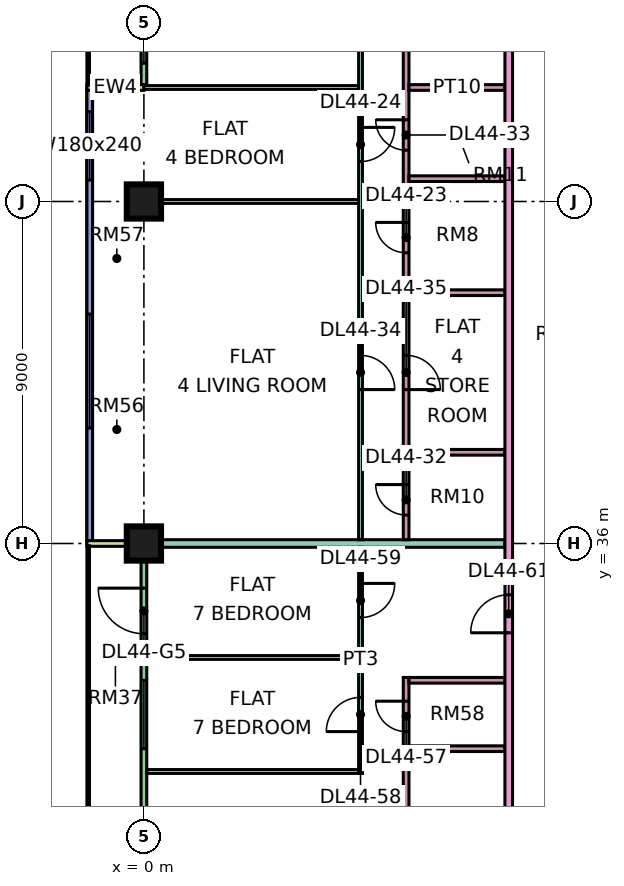
"""IFC4 building model, lengths in metres.
Left out: names, types, materials, properties, quantities, classifications, styles, units other than length and angle.
Written with IfcOpenShell. Run it as: python <this file> out.ifc"""

import sys

from ifc_helpers import new_model, si_unit, direction, frame, frame_2d, origin, origin_2d, place, context, subcontext, project, spatial, rectangle, extrude, element, fill, save


model = new_model("IFC4")
c1 = context("Model", 3, precision=1e-05, world=origin(), true_north=direction((0.0, 1.0)))
c2 = subcontext(c1, "Body", "Model", "MODEL_VIEW")
j1 = project(units=[si_unit("LENGTHUNIT", "METRE"), si_unit("PLANEANGLEUNIT", "RADIAN")], contexts=[c1])
p1 = place(None, origin())
s1 = spatial("IfcSite", under=j1, at=p1, CompositionType="ELEMENT")
p2 = place(p1, origin())
s2 = spatial("IfcBuilding", under=s1, at=p2, CompositionType="ELEMENT")
p3 = place(p2, frame((0.0, 0.0, 191.15)))
s3 = spatial("IfcBuildingStorey", under=s2, at=p3, CompositionType="ELEMENT", Elevation=191.15)
p4 = place(p3, frame((0.0, 36.0, 0.0), z_axis=(0.0, 0.0, 1.0), x_axis=(1.0, 0.0, 0.0)))
e1 = element("IfcColumn", 1, at=p4, inside=s3, PredefinedType="COLUMN", context=c2, shape_type="SweptSolid", body=[
    extrude(rectangle(XDim=0.9, YDim=0.9, at=origin_2d()), origin(), (0.0, 0.0, 1.0), 3.75),
])
p5 = place(p3, frame((0.0, 45.0, 0.0), z_axis=(0.0, 0.0, 1.0), x_axis=(1.0, 0.0, 0.0)))
e2 = element("IfcColumn", 2, at=p5, inside=s3, PredefinedType="COLUMN", context=c2, shape_type="SweptSolid", body=[
    extrude(rectangle(XDim=0.9, YDim=0.9, at=origin_2d()), origin(), (0.0, 0.0, 1.0), 3.75),
])
p6 = place(p3, frame((0.0, 61.425, 0.0), z_axis=(0.0, 0.0, 1.0), x_axis=(0.0, -1.0, 0.0)))
e3 = element("IfcWall", 3, at=p6, inside=s3, PredefinedType="SOLIDWALL", context=c2, shape_type="SweptSolid", body=[
    extrude(rectangle(XDim=13.35, YDim=0.15, at=frame_2d((6.675, 0.0))), origin(), (0.0, 0.0, 1.0), 3.35),
])
p7 = place(p6, frame((0.262, 0.0, 0.45)))
e4 = element("IfcOpeningElement", 4, at=p7, cuts=e3, PredefinedType="OPENING", context=c2, shape_type="SweptSolid", body=[
    extrude(rectangle(XDim=0.9, YDim=2.4, at=frame_2d((0.45, 1.2))), frame((0.0, 0.085, 0.0), z_axis=(0.0, -1.0, 0.0), x_axis=(1.0, 0.0, 0.0)), (0.0, 0.0, 1.0), 0.17),
])
p8 = place(p6, frame((2.025, 0.0, 0.0)))
e5 = element("IfcOpeningElement", 5, at=p8, cuts=e3, PredefinedType="OPENING", context=c2, shape_type="SweptSolid", body=[
    extrude(rectangle(XDim=1.8, YDim=2.4, at=frame_2d((0.9, 1.2))), frame((0.0, 0.085, 0.0), z_axis=(0.0, -1.0, 0.0), x_axis=(1.0, 0.0, 0.0)), (0.0, 0.0, 1.0), 0.17),
])
p9 = place(p6, frame((5.05, 0.0, 0.45)))
e6 = element("IfcOpeningElement", 6, at=p9, cuts=e3, PredefinedType="OPENING", context=c2, shape_type="SweptSolid", body=[
    extrude(rectangle(XDim=1.2, YDim=2.4, at=frame_2d((0.6, 1.2))), frame((0.0, 0.085, 0.0), z_axis=(0.0, -1.0, 0.0), x_axis=(1.0, 0.0, 0.0)), (0.0, 0.0, 1.0), 0.17),
])
p10 = place(p6, frame((8.6, 0.0, 0.45)))
e7 = element("IfcOpeningElement", 7, at=p10, cuts=e3, PredefinedType="OPENING", context=c2, shape_type="SweptSolid", body=[
    extrude(rectangle(XDim=1.2, YDim=2.4, at=frame_2d((0.6, 1.2))), frame((0.0, 0.085, 0.0), z_axis=(0.0, -1.0, 0.0), x_axis=(1.0, 0.0, 0.0)), (0.0, 0.0, 1.0), 0.17),
])
p11 = place(p6, frame((10.988, 0.0, 0.45)))
e8 = element("IfcOpeningElement", 8, at=p11, cuts=e3, PredefinedType="OPENING", context=c2, shape_type="SweptSolid", body=[
    extrude(rectangle(XDim=1.8, YDim=2.4, at=frame_2d((0.9, 1.2))), frame((0.0, 0.085, 0.0), z_axis=(0.0, -1.0, 0.0), x_axis=(1.0, 0.0, 0.0)), (0.0, 0.0, 1.0), 0.17),
])
p12 = place(p3, frame((-1.5, 48.0, 0.0), z_axis=(0.0, 0.0, 1.0), x_axis=(1.0, 0.0, 0.0)))
e9 = element("IfcWall", 9, at=p12, inside=s3, PredefinedType="SOLIDWALL", context=c2, shape_type="SweptSolid", body=[
    extrude(rectangle(XDim=1.5, YDim=0.15, at=frame_2d((0.75, 0.0))), origin(), (0.0, 0.0, 1.0), 3.35),
])
p13 = place(p3, frame((-1.425, 47.925, 0.0), z_axis=(0.0, 0.0, 1.0), x_axis=(0.0, -1.0, 0.0)))
e10 = element("IfcWall", 10, at=p13, inside=s3, PredefinedType="SOLIDWALL", context=c2, shape_type="SweptSolid", body=[
    extrude(rectangle(XDim=11.85, YDim=0.15, at=frame_2d((5.925, 0.0))), origin(), (0.0, 0.0, 1.0), 3.35),
])
p14 = place(p13, frame((0.562, 0.0, 0.45)))
e11 = element("IfcOpeningElement", 11, at=p14, cuts=e10, PredefinedType="OPENING", context=c2, shape_type="SweptSolid", body=[
    extrude(rectangle(XDim=1.8, YDim=2.4, at=frame_2d((0.9, 1.2))), frame((0.0, 0.085, 0.0), z_axis=(0.0, -1.0, 0.0), x_axis=(1.0, 0.0, 0.0)), (0.0, 0.0, 1.0), 0.17),
])
p15 = place(p13, frame((5.887, 0.0, 0.45)))
e12 = element("IfcOpeningElement", 12, at=p15, cuts=e10, PredefinedType="OPENING", context=c2, shape_type="SweptSolid", body=[
    extrude(rectangle(XDim=3.0, YDim=2.4, at=frame_2d((1.5, 1.2))), frame((0.0, 0.085, 0.0), z_axis=(0.0, -1.0, 0.0), x_axis=(1.0, 0.0, 0.0)), (0.0, 0.0, 1.0), 0.17),
])
p16 = place(p3, frame((0.0, 35.925, 0.0), z_axis=(0.0, 0.0, 1.0), x_axis=(0.0, -1.0, 0.0)))
e13 = element("IfcWall", 13, at=p16, inside=s3, PredefinedType="SOLIDWALL", context=c2, shape_type="SweptSolid", body=[
    extrude(rectangle(XDim=11.85, YDim=0.15, at=frame_2d((5.925, 0.0))), origin(), (0.0, 0.0, 1.0), 3.35),
])
p17 = place(p16, frame((1.1, 0.0, 0.0)))
e14 = element("IfcOpeningElement", 14, at=p17, cuts=e13, PredefinedType="OPENING", context=c2, shape_type="SweptSolid", body=[
    extrude(rectangle(XDim=1.2, YDim=2.4, at=frame_2d((0.6, 1.2))), frame((0.0, 0.085, 0.0), z_axis=(0.0, -1.0, 0.0), x_axis=(1.0, 0.0, 0.0)), (0.0, 0.0, 1.0), 0.17),
])
p18 = place(p16, frame((3.525, 0.0, 0.45)))
e15 = element("IfcOpeningElement", 15, at=p18, cuts=e13, PredefinedType="OPENING", context=c2, shape_type="SweptSolid", body=[
    extrude(rectangle(XDim=1.8, YDim=2.4, at=frame_2d((0.9, 1.2))), frame((0.0, 0.085, 0.0), z_axis=(0.0, -1.0, 0.0), x_axis=(1.0, 0.0, 0.0)), (0.0, 0.0, 1.0), 0.17),
])
p19 = place(p16, frame((7.15, 0.0, 0.45)))
e16 = element("IfcOpeningElement", 16, at=p19, cuts=e13, PredefinedType="OPENING", context=c2, shape_type="SweptSolid", body=[
    extrude(rectangle(XDim=3.0, YDim=2.4, at=frame_2d((1.5, 1.2))), frame((0.0, 0.085, 0.0), z_axis=(0.0, -1.0, 0.0), x_axis=(1.0, 0.0, 0.0)), (0.0, 0.0, 1.0), 0.17),
])
p20 = place(p3, frame((-1.5, 36.0, 0.0), z_axis=(0.0, 0.0, 1.0), x_axis=(1.0, 0.0, 0.0)))
e17 = element("IfcWall", 17, at=p20, inside=s3, PredefinedType="SOLIDWALL", context=c2, shape_type="SweptSolid", body=[
    extrude(rectangle(XDim=1.5, YDim=0.15, at=frame_2d((0.75, 0.0))), origin(), (0.0, 0.0, 1.0), 3.35),
])
e18 = element("IfcWall", 18, at=p4, inside=s3, PredefinedType="PARTITIONING", context=c2, shape_type="SweptSolid", body=[
    extrude(rectangle(XDim=9.5, YDim=0.2, at=frame_2d((4.75, 0.0))), origin(), (0.0, 0.0, 1.0), 3.35),
])
e19 = element("IfcWall", 19, at=p5, inside=s3, PredefinedType="PARTITIONING", context=c2, shape_type="SweptSolid", body=[
    extrude(rectangle(XDim=5.65, YDim=0.1, at=frame_2d((2.825, 0.0))), origin(), (0.0, 0.0, 1.0), 3.35),
])
p21 = place(p3, frame((0.0, 48.0, 0.0), z_axis=(0.0, 0.0, 1.0), x_axis=(1.0, 0.0, 0.0)))
e20 = element("IfcWall", 20, at=p21, inside=s3, PredefinedType="PARTITIONING", context=c2, shape_type="SweptSolid", body=[
    extrude(rectangle(XDim=5.65, YDim=0.1, at=frame_2d((2.825, 0.0))), origin(), (0.0, 0.0, 1.0), 3.35),
])
for number, where, z_axis, x_axis in (
    (21, (0.074, 30.0, 0.0), (0.0, 0.0, 1.0), (1.0, 0.0, 0.0)),
    (22, (0.074, 33.0, 0.0), (0.0, 0.0, 1.0), (1.0, 0.0, 0.0)),
):
    element("IfcWall", number, at=place(p3, frame(where, z_axis=z_axis, x_axis=x_axis)), inside=s3, PredefinedType="PARTITIONING", context=c2, shape_type="SweptSolid", body=[
        extrude(rectangle(XDim=5.576, YDim=0.1, at=frame_2d((2.788, 0.0))), origin(), (0.0, 0.0, 1.0), 3.35),
    ])
p22 = place(p3, frame((5.7, 29.95, 0.0), z_axis=(0.0, 0.0, 1.0), x_axis=(0.0, 1.0, 0.0)))
e23 = element("IfcWall", 23, at=p22, inside=s3, PredefinedType="PARTITIONING", context=c2, shape_type="SweptSolid", body=[
    extrude(rectangle(XDim=5.95, YDim=0.1, at=frame_2d((2.975, 0.0))), origin(), (0.0, 0.0, 1.0), 3.35),
])
p23 = place(p22, frame((1.1, 0.0, 0.0)))
e24 = element("IfcOpeningElement", 24, at=p23, cuts=e23, PredefinedType="OPENING", context=c2, shape_type="SweptSolid", body=[
    extrude(rectangle(XDim=0.9, YDim=2.1, at=frame_2d((0.45, 1.05))), frame((0.0, 0.06, 0.0), z_axis=(0.0, -1.0, 0.0), x_axis=(1.0, 0.0, 0.0)), (0.0, 0.0, 1.0), 0.12),
])
p24 = place(p22, frame((4.1, 0.0, 0.0)))
e25 = element("IfcOpeningElement", 25, at=p24, cuts=e23, PredefinedType="OPENING", context=c2, shape_type="SweptSolid", body=[
    extrude(rectangle(XDim=0.9, YDim=2.1, at=frame_2d((0.45, 1.05))), frame((0.0, 0.06, 0.0), z_axis=(0.0, -1.0, 0.0), x_axis=(1.0, 0.0, 0.0)), (0.0, 0.0, 1.0), 0.12),
])
p25 = place(p3, frame((5.7, 36.1, 0.0), z_axis=(0.0, 0.0, 1.0), x_axis=(0.0, 1.0, 0.0)))
e26 = element("IfcWall", 26, at=p25, inside=s3, PredefinedType="PARTITIONING", context=c2, shape_type="SweptSolid", body=[
    extrude(rectangle(XDim=26.826, YDim=0.1, at=frame_2d((13.413, 0.0))), origin(), (0.0, 0.0, 1.0), 3.35),
])
p26 = place(p25, frame((9.95, 0.0, 0.0)))
e27 = element("IfcOpeningElement", 27, at=p26, cuts=e26, PredefinedType="OPENING", context=c2, shape_type="SweptSolid", body=[
    extrude(rectangle(XDim=0.9, YDim=2.1, at=frame_2d((0.45, 1.05))), frame((0.0, 0.06, 0.0), z_axis=(0.0, -1.0, 0.0), x_axis=(1.0, 0.0, 0.0)), (0.0, 0.0, 1.0), 0.12),
])
p27 = place(p25, frame((12.95, 0.0, 0.0)))
e28 = element("IfcOpeningElement", 28, at=p27, cuts=e26, PredefinedType="OPENING", context=c2, shape_type="SweptSolid", body=[
    extrude(rectangle(XDim=0.9, YDim=2.1, at=frame_2d((0.45, 1.05))), frame((0.0, 0.06, 0.0), z_axis=(0.0, -1.0, 0.0), x_axis=(1.0, 0.0, 0.0)), (0.0, 0.0, 1.0), 0.12),
])
p28 = place(p25, frame((15.95, 0.0, 0.0)))
e29 = element("IfcOpeningElement", 29, at=p28, cuts=e26, PredefinedType="OPENING", context=c2, shape_type="SweptSolid", body=[
    extrude(rectangle(XDim=0.9, YDim=2.1, at=frame_2d((0.45, 1.05))), frame((0.0, 0.06, 0.0), z_axis=(0.0, -1.0, 0.0), x_axis=(1.0, 0.0, 0.0)), (0.0, 0.0, 1.0), 0.12),
])
p29 = place(p25, frame((18.95, 0.0, 0.0)))
e30 = element("IfcOpeningElement", 30, at=p29, cuts=e26, PredefinedType="OPENING", context=c2, shape_type="SweptSolid", body=[
    extrude(rectangle(XDim=0.9, YDim=2.1, at=frame_2d((0.45, 1.05))), frame((0.0, 0.06, 0.0), z_axis=(0.0, -1.0, 0.0), x_axis=(1.0, 0.0, 0.0)), (0.0, 0.0, 1.0), 0.12),
])
p30 = place(p25, frame((24.95, 0.0, 0.0)))
e31 = element("IfcOpeningElement", 31, at=p30, cuts=e26, PredefinedType="OPENING", context=c2, shape_type="SweptSolid", body=[
    extrude(rectangle(XDim=0.9, YDim=2.1, at=frame_2d((0.45, 1.05))), frame((0.0, 0.06, 0.0), z_axis=(0.0, -1.0, 0.0), x_axis=(1.0, 0.0, 0.0)), (0.0, 0.0, 1.0), 0.12),
])
p31 = place(p25, frame((3.95, 0.0, 0.0)))
e32 = element("IfcOpeningElement", 32, at=p31, cuts=e26, PredefinedType="OPENING", context=c2, shape_type="SweptSolid", body=[
    extrude(rectangle(XDim=0.9, YDim=2.1, at=frame_2d((0.45, 1.05))), frame((0.0, 0.06, 0.0), z_axis=(0.0, -1.0, 0.0), x_axis=(1.0, 0.0, 0.0)), (0.0, 0.0, 1.0), 0.12),
])
p32 = place(p25, frame((21.95, 0.0, 0.0)))
e33 = element("IfcOpeningElement", 33, at=p32, cuts=e26, PredefinedType="OPENING", context=c2, shape_type="SweptSolid", body=[
    extrude(rectangle(XDim=0.9, YDim=2.1, at=frame_2d((0.45, 1.05))), frame((0.0, 0.06, 0.0), z_axis=(0.0, -1.0, 0.0), x_axis=(1.0, 0.0, 0.0)), (0.0, 0.0, 1.0), 0.12),
])
p33 = place(p3, frame((6.9, 22.5, 0.0), z_axis=(0.0, 0.0, 1.0), x_axis=(0.0, 1.0, 0.0)))
e34 = element("IfcWall", 34, at=p33, inside=s3, PredefinedType="PARTITIONING", context=c2, shape_type="SweptSolid", body=[
    extrude(rectangle(XDim=9.975, YDim=0.15, at=frame_2d((4.988, 0.0))), origin(), (0.0, 0.0, 1.0), 3.35),
])
p34 = place(p33, frame((8.55, 0.0, 0.0)))
e35 = element("IfcOpeningElement", 35, at=p34, cuts=e34, PredefinedType="OPENING", context=c2, shape_type="SweptSolid", body=[
    extrude(rectangle(XDim=0.8, YDim=2.1, at=frame_2d((0.4, 1.05))), frame((0.0, 0.085, 0.0), z_axis=(0.0, -1.0, 0.0), x_axis=(1.0, 0.0, 0.0)), (0.0, 0.0, 1.0), 0.17),
])
p35 = place(p33, frame((3.5, 0.0, 0.0)))
e36 = element("IfcOpeningElement", 36, at=p35, cuts=e34, PredefinedType="OPENING", context=c2, shape_type="SweptSolid", body=[
    extrude(rectangle(XDim=0.9, YDim=2.1, at=frame_2d((0.45, 1.05))), frame((0.0, 0.085, 0.0), z_axis=(0.0, -1.0, 0.0), x_axis=(1.0, 0.0, 0.0)), (0.0, 0.0, 1.0), 0.17),
])
p36 = place(p3, frame((6.9, 36.1, 0.0), z_axis=(0.0, 0.0, 1.0), x_axis=(0.0, 1.0, 0.0)))
e37 = element("IfcWall", 37, at=p36, inside=s3, PredefinedType="PARTITIONING", context=c2, shape_type="SweptSolid", body=[
    extrude(rectangle(XDim=14.675, YDim=0.15, at=frame_2d((7.337, 0.0))), origin(), (0.0, 0.0, 1.0), 3.35),
])
p37 = place(p36, frame((7.55, 0.0, 0.0)))
e38 = element("IfcOpeningElement", 38, at=p37, cuts=e37, PredefinedType="OPENING", context=c2, shape_type="SweptSolid", body=[
    extrude(rectangle(XDim=0.8, YDim=2.1, at=frame_2d((0.4, 1.05))), frame((0.0, 0.085, 0.0), z_axis=(0.0, -1.0, 0.0), x_axis=(1.0, 0.0, 0.0)), (0.0, 0.0, 1.0), 0.17),
])
p38 = place(p36, frame((0.65, 0.0, 0.0)))
e39 = element("IfcOpeningElement", 39, at=p38, cuts=e37, PredefinedType="OPENING", context=c2, shape_type="SweptSolid", body=[
    extrude(rectangle(XDim=0.8, YDim=2.1, at=frame_2d((0.4, 1.05))), frame((0.0, 0.085, 0.0), z_axis=(0.0, -1.0, 0.0), x_axis=(1.0, 0.0, 0.0)), (0.0, 0.0, 1.0), 0.17),
])
p39 = place(p36, frame((10.25, 0.0, 0.0)))
e40 = element("IfcOpeningElement", 40, at=p39, cuts=e37, PredefinedType="OPENING", context=c2, shape_type="SweptSolid", body=[
    extrude(rectangle(XDim=0.8, YDim=2.1, at=frame_2d((0.4, 1.05))), frame((0.0, 0.085, 0.0), z_axis=(0.0, -1.0, 0.0), x_axis=(1.0, 0.0, 0.0)), (0.0, 0.0, 1.0), 0.17),
])
p40 = place(p36, frame((3.95, 0.0, 0.0)))
e41 = element("IfcOpeningElement", 41, at=p40, cuts=e37, PredefinedType="OPENING", context=c2, shape_type="SweptSolid", body=[
    extrude(rectangle(XDim=0.9, YDim=2.1, at=frame_2d((0.45, 1.05))), frame((0.0, 0.085, 0.0), z_axis=(0.0, -1.0, 0.0), x_axis=(1.0, 0.0, 0.0)), (0.0, 0.0, 1.0), 0.17),
])
for number, where, z_axis, x_axis in (
    (42, (6.975, 30.6, 0.0), (0.0, 0.0, 1.0), (1.0, 0.0, 0.0)),
    (43, (6.975, 32.4, 0.0), (0.0, 0.0, 1.0), (1.0, 0.0, 0.0)),
    (44, (6.975, 38.4, 0.0), (0.0, 0.0, 1.0), (1.0, 0.0, 0.0)),
    (45, (6.975, 42.6, 0.0), (0.0, 0.0, 1.0), (1.0, 0.0, 0.0)),
    (46, (6.975, 45.6, 0.0), (0.0, 0.0, 1.0), (1.0, 0.0, 0.0)),
    (47, (6.975, 48.0, 0.0), (0.0, 0.0, 1.0), (1.0, 0.0, 0.0)),
):
    element("IfcWall", number, at=place(p3, frame(where, z_axis=z_axis, x_axis=x_axis)), inside=s3, PredefinedType="PARTITIONING", context=c2, shape_type="SweptSolid", body=[
        extrude(rectangle(XDim=2.525, YDim=0.15, at=frame_2d((1.262, 0.0))), origin(), (0.0, 0.0, 1.0), 3.35),
    ])
p41 = place(p3, frame((9.6, 20.0, 0.0), z_axis=(0.0, 0.0, 1.0), x_axis=(0.0, 1.0, 0.0)))
e48 = element("IfcWall", 48, at=p41, inside=s3, PredefinedType="PARTITIONING", context=c2, shape_type="SweptSolid", body=[
    extrude(rectangle(XDim=42.926, YDim=0.2, at=frame_2d((21.463, 0.0))), origin(), (0.0, 0.0, 1.0), 3.35),
])
p42 = place(p41, frame((31.65, 0.0, 0.0)))
e49 = element("IfcOpeningElement", 49, at=p42, cuts=e48, PredefinedType="OPENING", context=c2, shape_type="SweptSolid", body=[
    extrude(rectangle(XDim=1.0, YDim=2.1, at=frame_2d((0.5, 1.05))), frame((0.0, 0.11, 0.0), z_axis=(0.0, -1.0, 0.0), x_axis=(1.0, 0.0, 0.0)), (0.0, 0.0, 1.0), 0.22),
])
p43 = place(p41, frame((0.6, 0.0, 0.0)))
e50 = element("IfcOpeningElement", 50, at=p43, cuts=e48, PredefinedType="OPENING", context=c2, shape_type="SweptSolid", body=[
    extrude(rectangle(XDim=1.2, YDim=2.1, at=frame_2d((0.6, 1.05))), frame((0.0, 0.11, 0.0), z_axis=(0.0, -1.0, 0.0), x_axis=(1.0, 0.0, 0.0)), (0.0, 0.0, 1.0), 0.22),
])
p44 = place(p41, frame((13.65, 0.0, 0.0)))
e51 = element("IfcOpeningElement", 51, at=p44, cuts=e48, PredefinedType="OPENING", context=c2, shape_type="SweptSolid", body=[
    extrude(rectangle(XDim=1.0, YDim=2.1, at=frame_2d((0.5, 1.05))), frame((0.0, 0.11, 0.0), z_axis=(0.0, -1.0, 0.0), x_axis=(1.0, 0.0, 0.0)), (0.0, 0.0, 1.0), 0.22),
])
p45 = place(p11, origin())
e52 = element("IfcWindow", 52, at=p45, inside=s3, PartitioningType="SINGLE_PANEL", PredefinedType="WINDOW", context=c2, shape_type="SweptSolid", body=[
    extrude(rectangle(XDim=1.8, YDim=2.4, at=frame_2d((0.9, 1.2))), frame((0.0, 0.03, 0.0), z_axis=(0.0, -1.0, 0.0), x_axis=(1.0, 0.0, 0.0)), (0.0, 0.0, 1.0), 0.06),
])
fill(e8, e52)
p46 = place(p14, origin())
e53 = element("IfcWindow", 53, at=p46, inside=s3, PartitioningType="SINGLE_PANEL", PredefinedType="WINDOW", context=c2, shape_type="SweptSolid", body=[
    extrude(rectangle(XDim=1.8, YDim=2.4, at=frame_2d((0.9, 1.2))), frame((0.0, 0.03, 0.0), z_axis=(0.0, -1.0, 0.0), x_axis=(1.0, 0.0, 0.0)), (0.0, 0.0, 1.0), 0.06),
])
fill(e11, e53)
p47 = place(p15, origin())
e54 = element("IfcWindow", 54, at=p47, inside=s3, PartitioningType="SINGLE_PANEL", PredefinedType="WINDOW", context=c2, shape_type="SweptSolid", body=[
    extrude(rectangle(XDim=3.0, YDim=2.4, at=frame_2d((1.5, 1.2))), frame((0.0, 0.03, 0.0), z_axis=(0.0, -1.0, 0.0), x_axis=(1.0, 0.0, 0.0)), (0.0, 0.0, 1.0), 0.06),
])
fill(e12, e54)
p48 = place(p17, frame((1.2, 0.0, 0.0), z_axis=(0.0, 0.0, 1.0), x_axis=(-1.0, 0.0, 0.0)))
e55 = element("IfcDoor", 55, at=p48, inside=s3, OperationType="DOUBLE_DOOR_SINGLE_SWING", PredefinedType="DOOR", context=c2, shape_type="SweptSolid", body=[
    extrude(rectangle(XDim=1.2, YDim=2.4, at=frame_2d((0.6, 1.2))), frame((0.0, 0.025, 0.0), z_axis=(0.0, -1.0, 0.0), x_axis=(1.0, 0.0, 0.0)), (0.0, 0.0, 1.0), 0.05),
])
fill(e14, e55)
p49 = place(p18, origin())
e56 = element("IfcWindow", 56, at=p49, inside=s3, PartitioningType="SINGLE_PANEL", PredefinedType="WINDOW", context=c2, shape_type="SweptSolid", body=[
    extrude(rectangle(XDim=1.8, YDim=2.4, at=frame_2d((0.9, 1.2))), frame((0.0, 0.03, 0.0), z_axis=(0.0, -1.0, 0.0), x_axis=(1.0, 0.0, 0.0)), (0.0, 0.0, 1.0), 0.06),
])
fill(e15, e56)
p50 = place(p37, frame((0.8, 0.0, 0.0), z_axis=(0.0, 0.0, 1.0), x_axis=(-1.0, 0.0, 0.0)))
e57 = element("IfcDoor", 57, at=p50, inside=s3, OperationType="SINGLE_SWING_RIGHT", PredefinedType="DOOR", context=c2, shape_type="SweptSolid", body=[
    extrude(rectangle(XDim=0.8, YDim=2.1, at=frame_2d((0.4, 1.05))), frame((0.0, 0.025, 0.0), z_axis=(0.0, -1.0, 0.0), x_axis=(1.0, 0.0, 0.0)), (0.0, 0.0, 1.0), 0.05),
])
fill(e38, e57)
p51 = place(p26, origin())
e58 = element("IfcDoor", 58, at=p51, inside=s3, OperationType="SINGLE_SWING_RIGHT", PredefinedType="DOOR", context=c2, shape_type="SweptSolid", body=[
    extrude(rectangle(XDim=0.9, YDim=2.1, at=frame_2d((0.45, 1.05))), frame((0.0, 0.025, 0.0), z_axis=(0.0, -1.0, 0.0), x_axis=(1.0, 0.0, 0.0)), (0.0, 0.0, 1.0), 0.05),
])
fill(e27, e58)
p52 = place(p38, frame((0.8, 0.0, 0.0), z_axis=(0.0, 0.0, 1.0), x_axis=(-1.0, 0.0, 0.0)))
e59 = element("IfcDoor", 59, at=p52, inside=s3, OperationType="SINGLE_SWING_RIGHT", PredefinedType="DOOR", context=c2, shape_type="SweptSolid", body=[
    extrude(rectangle(XDim=0.8, YDim=2.1, at=frame_2d((0.4, 1.05))), frame((0.0, 0.025, 0.0), z_axis=(0.0, -1.0, 0.0), x_axis=(1.0, 0.0, 0.0)), (0.0, 0.0, 1.0), 0.05),
])
fill(e39, e59)
p53 = place(p39, frame((0.8, 0.0, 0.0), z_axis=(0.0, 0.0, 1.0), x_axis=(-1.0, 0.0, 0.0)))
e60 = element("IfcDoor", 60, at=p53, inside=s3, OperationType="SINGLE_SWING_RIGHT", PredefinedType="DOOR", context=c2, shape_type="SweptSolid", body=[
    extrude(rectangle(XDim=0.8, YDim=2.1, at=frame_2d((0.4, 1.05))), frame((0.0, 0.025, 0.0), z_axis=(0.0, -1.0, 0.0), x_axis=(1.0, 0.0, 0.0)), (0.0, 0.0, 1.0), 0.05),
])
fill(e40, e60)
p54 = place(p31, frame((0.9, 0.0, 0.0), z_axis=(0.0, 0.0, 1.0), x_axis=(-1.0, 0.0, 0.0)))
e61 = element("IfcDoor", 61, at=p54, inside=s3, OperationType="SINGLE_SWING_LEFT", PredefinedType="DOOR", context=c2, shape_type="SweptSolid", body=[
    extrude(rectangle(XDim=0.9, YDim=2.1, at=frame_2d((0.45, 1.05))), frame((0.0, 0.025, 0.0), z_axis=(0.0, -1.0, 0.0), x_axis=(1.0, 0.0, 0.0)), (0.0, 0.0, 1.0), 0.05),
])
fill(e32, e61)
p55 = place(p40, frame((0.9, 0.0, 0.0), z_axis=(0.0, 0.0, 1.0), x_axis=(-1.0, 0.0, 0.0)))
e62 = element("IfcDoor", 62, at=p55, inside=s3, OperationType="SINGLE_SWING_LEFT", PredefinedType="DOOR", context=c2, shape_type="SweptSolid", body=[
    extrude(rectangle(XDim=0.9, YDim=2.1, at=frame_2d((0.45, 1.05))), frame((0.0, 0.025, 0.0), z_axis=(0.0, -1.0, 0.0), x_axis=(1.0, 0.0, 0.0)), (0.0, 0.0, 1.0), 0.05),
])
fill(e41, e62)
p56 = place(p34, frame((0.8, 0.0, 0.0), z_axis=(0.0, 0.0, 1.0), x_axis=(-1.0, 0.0, 0.0)))
e63 = element("IfcDoor", 63, at=p56, inside=s3, OperationType="SINGLE_SWING_RIGHT", PredefinedType="DOOR", context=c2, shape_type="SweptSolid", body=[
    extrude(rectangle(XDim=0.8, YDim=2.1, at=frame_2d((0.4, 1.05))), frame((0.0, 0.025, 0.0), z_axis=(0.0, -1.0, 0.0), x_axis=(1.0, 0.0, 0.0)), (0.0, 0.0, 1.0), 0.05),
])
fill(e35, e63)
p57 = place(p23, origin())
e64 = element("IfcDoor", 64, at=p57, inside=s3, OperationType="SINGLE_SWING_LEFT", PredefinedType="DOOR", context=c2, shape_type="SweptSolid", body=[
    extrude(rectangle(XDim=0.9, YDim=2.1, at=frame_2d((0.45, 1.05))), frame((0.0, 0.025, 0.0), z_axis=(0.0, -1.0, 0.0), x_axis=(1.0, 0.0, 0.0)), (0.0, 0.0, 1.0), 0.05),
])
fill(e24, e64)
p58 = place(p24, origin())
e65 = element("IfcDoor", 65, at=p58, inside=s3, OperationType="SINGLE_SWING_RIGHT", PredefinedType="DOOR", context=c2, shape_type="SweptSolid", body=[
    extrude(rectangle(XDim=0.9, YDim=2.1, at=frame_2d((0.45, 1.05))), frame((0.0, 0.025, 0.0), z_axis=(0.0, -1.0, 0.0), x_axis=(1.0, 0.0, 0.0)), (0.0, 0.0, 1.0), 0.05),
])
fill(e25, e65)
p59 = place(p44, origin())
e66 = element("IfcDoor", 66, at=p59, inside=s3, OperationType="SINGLE_SWING_LEFT", PredefinedType="DOOR", context=c2, shape_type="SweptSolid", body=[
    extrude(rectangle(XDim=1.0, YDim=2.1, at=frame_2d((0.5, 1.05))), frame((0.0, 0.025, 0.0), z_axis=(0.0, -1.0, 0.0), x_axis=(1.0, 0.0, 0.0)), (0.0, 0.0, 1.0), 0.05),
])
fill(e51, e66)
save(model, sys.argv[1])
